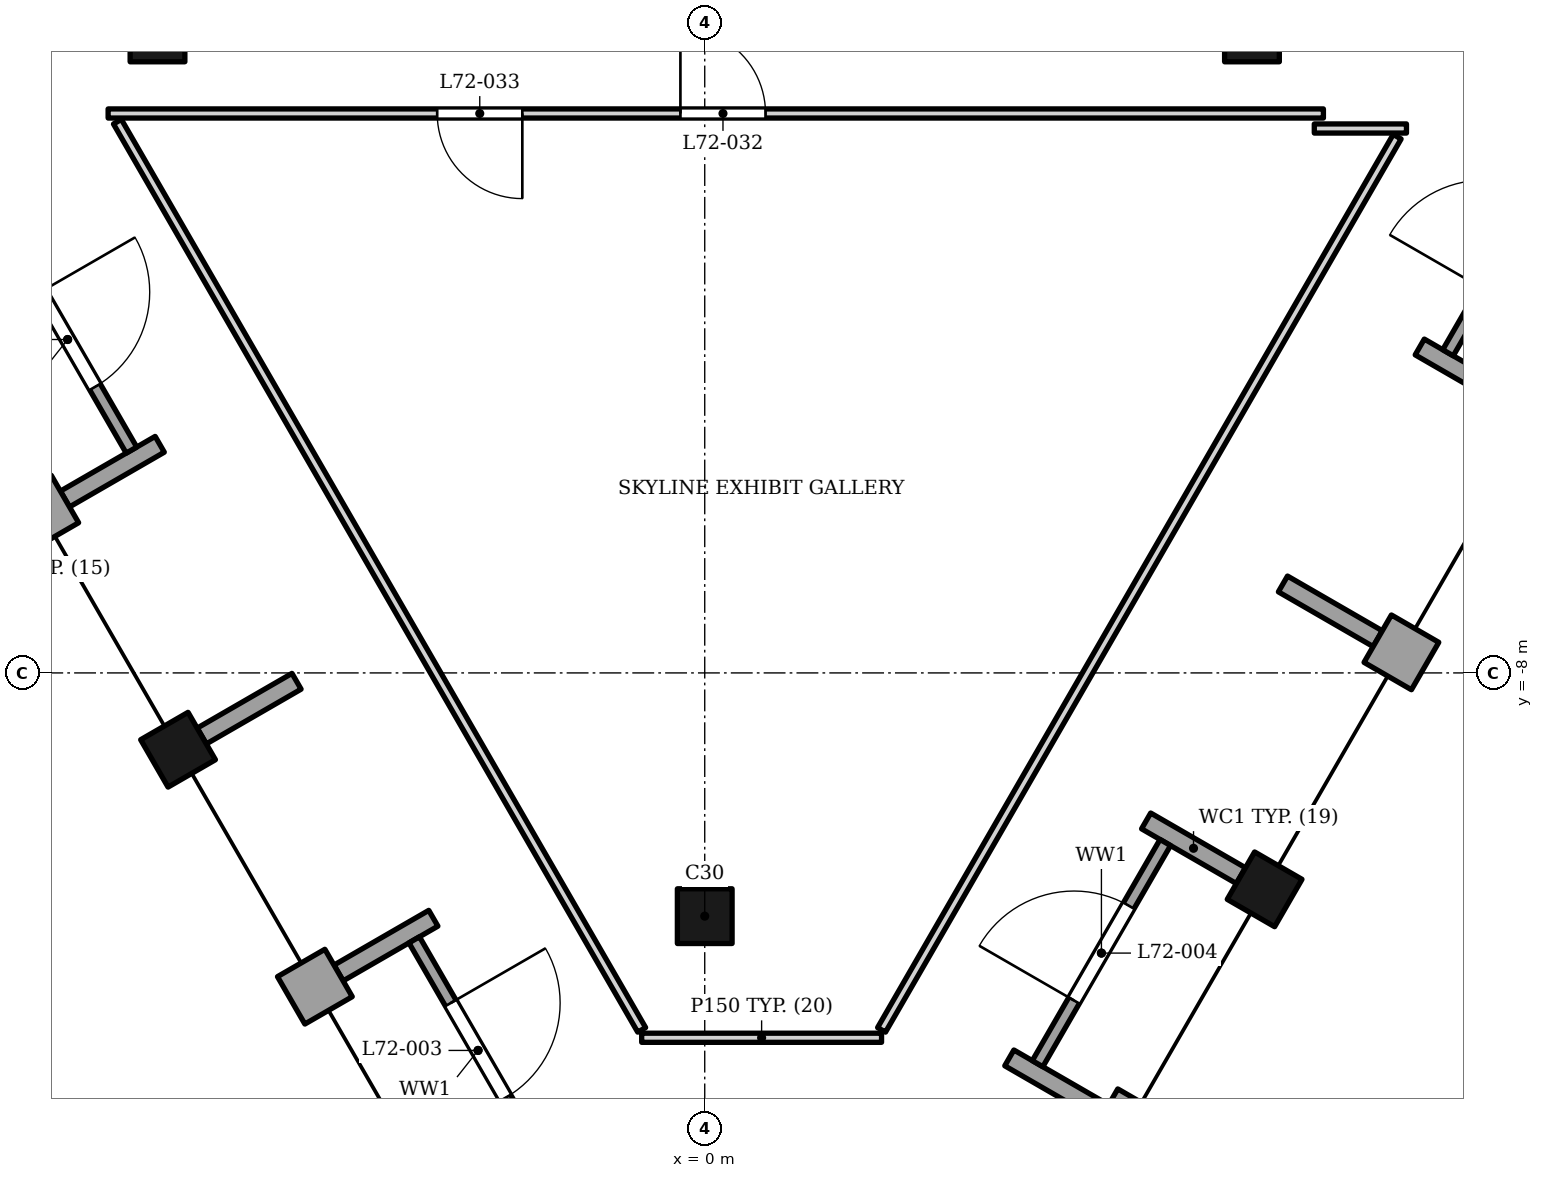
"""IFC4 building model, lengths in metres.
Left out: names, types, materials, properties, quantities, classifications, styles, units other than length and angle.
Written with IfcOpenShell. Run it as: python <this file> out.ifc"""

import sys

from ifc_helpers import new_model, si_unit, direction, frame, frame_2d, origin, origin_2d, place, context, subcontext, project, spatial, rectangle, extrude, element, fill, save


model = new_model("IFC4")
c1 = context("Model", 3, precision=1e-05, world=origin(), true_north=direction((0.0, 1.0)))
c2 = subcontext(c1, "Body", "Model", "MODEL_VIEW")
j1 = project(units=[si_unit("LENGTHUNIT", "METRE"), si_unit("PLANEANGLEUNIT", "RADIAN")], contexts=[c1])
p1 = place(None, origin())
s1 = spatial("IfcSite", under=j1, at=p1, CompositionType="ELEMENT")
p2 = place(p1, origin())
s2 = spatial("IfcBuilding", under=s1, at=p2, CompositionType="ELEMENT")
p3 = place(p2, frame((0.0, 0.0, 302.5)))
s3 = spatial("IfcBuildingStorey", under=s2, at=p3, CompositionType="ELEMENT", Elevation=302.5)
for number, where, z_axis, x_axis in (
    (1, (-9.0, 2.5, 0.0), (0.0, 0.0, 1.0), (1.0, 0.0, 0.0)),
    (2, (9.0, 2.5, 0.0), (0.0, 0.0, 1.0), (1.0, 0.0, 0.0)),
    (3, (0.0, -12.0, 0.0), (0.0, 0.0, 1.0), (1.0, 0.0, 0.0)),
    (4, (-8.662, -9.263, 0.0), (0.0, 0.0, 1.0), (0.5, -0.866, 0.0)),
    (5, (9.208, -11.559, 0.0), (0.0, 0.0, 1.0), (0.5, 0.866, 0.0)),
):
    element("IfcColumn", number, at=place(p3, frame(where, z_axis=z_axis, x_axis=x_axis)), inside=s3, PredefinedType="COLUMN", context=c2, shape_type="SweptSolid", body=[
        extrude(rectangle(XDim=0.9, YDim=0.9, at=origin_2d()), origin(), (0.0, 0.0, 1.0), 8.0),
    ])
p4 = place(p3, frame((-11.137, -4.976, 0.0), z_axis=(0.0, 0.0, 1.0), x_axis=(0.500223362819, -0.865896406789, 0.0)))
e6 = element("IfcWall", 6, at=p4, inside=s3, PredefinedType="SOLIDWALL", context=c2, shape_type="SweptSolid", body=[
    extrude(rectangle(XDim=0.9, YDim=0.9, at=frame_2d((0.45, 0.0))), origin(), (0.0, 0.0, 1.0), 7.0),
])
for number, where, z_axis, x_axis in (
    (7, (-10.522, -5.14, 0.0), (0.0, 0.0, 1.0), (0.866, 0.5, 0.0)),
    (8, (-6.713, -8.138, 0.0), (0.0, 0.0, 1.0), (-0.866, -0.5, 0.0)),
):
    element("IfcWall", number, at=place(p3, frame(where, z_axis=z_axis, x_axis=x_axis)), inside=s3, PredefinedType="SOLIDWALL", context=c2, shape_type="SweptSolid", body=[
        extrude(rectangle(XDim=1.8, YDim=0.3, at=frame_2d((0.9, 0.0))), origin(), (0.0, 0.0, 1.0), 7.0),
    ])
p5 = place(p3, frame((-6.187, -13.55, 0.0), z_axis=(0.0, 0.0, 1.0), x_axis=(-0.500105887137, 0.865964261186, 0.0)))
e9 = element("IfcWall", 9, at=p5, inside=s3, PredefinedType="SOLIDWALL", context=c2, shape_type="SweptSolid", body=[
    extrude(rectangle(XDim=0.9, YDim=0.9, at=frame_2d((0.45, 0.0))), origin(), (0.0, 0.0, 1.0), 7.0),
])
p6 = place(p3, frame((-6.022, -12.935, 0.0), z_axis=(0.0, 0.0, 1.0), x_axis=(0.865989075817, 0.500062916607, 0.0)))
e10 = element("IfcWall", 10, at=p6, inside=s3, PredefinedType="SOLIDWALL", context=c2, shape_type="SweptSolid", body=[
    extrude(rectangle(XDim=1.8, YDim=0.3, at=frame_2d((0.9, 0.0))), origin(), (0.0, 0.0, 1.0), 7.0),
])
p7 = place(p3, frame((-11.528, -0.698, 0.0), z_axis=(0.0, 0.0, 1.0), x_axis=(0.500002543286, -0.866023935413, 0.0)))
e11 = element("IfcWall", 11, at=p7, inside=s3, PredefinedType="ELEMENTEDWALL", context=c2, shape_type="SweptSolid", body=[
    extrude(rectangle(XDim=4.2, YDim=0.2, at=frame_2d((2.1, 0.0))), origin(), (0.0, 0.0, 1.0), 7.0),
])
p8 = place(p7, frame((1.2, 0.0, 0.0)))
e12 = element("IfcOpeningElement", 12, at=p8, cuts=e11, PredefinedType="OPENING", context=c2, shape_type="SweptSolid", body=[
    extrude(rectangle(XDim=1.8, YDim=2.7, at=frame_2d((0.9, 1.35))), frame((0.0, 0.11, 0.0), z_axis=(0.0, -1.0, 0.0), x_axis=(1.0, 0.0, 0.0)), (0.0, 0.0, 1.0), 0.22),
])
for number, where, z_axis, x_axis in (
    (13, (-10.687, -5.755, 0.0), (0.0, 0.0, 1.0), (0.5, -0.866, 0.0)),
    (14, (-8.437, -9.652, 0.0), (0.0, 0.0, 1.0), (0.5, -0.866, 0.0)),
    (15, (-6.187, -13.55, 0.0), (0.0, 0.0, 1.0), (0.5, -0.866, 0.0)),
):
    element("IfcWall", number, at=place(p3, frame(where, z_axis=z_axis, x_axis=x_axis)), inside=s3, PredefinedType="PARAPET", context=c2, shape_type="SweptSolid", body=[
        extrude(rectangle(XDim=3.6, YDim=0.2, at=frame_2d((1.8, 0.0))), origin(), (0.0, 0.0, 1.0), 1.1),
    ])
p9 = place(p3, frame((-4.778, -12.39, 0.0), z_axis=(0.0, 0.0, 1.0), x_axis=(0.500027713859, -0.866009402589, 0.0)))
e16 = element("IfcWall", 16, at=p9, inside=s3, PredefinedType="ELEMENTEDWALL", context=c2, shape_type="SweptSolid", body=[
    extrude(rectangle(XDim=4.2, YDim=0.2, at=frame_2d((2.1, 0.0))), origin(), (0.0, 0.0, 1.0), 7.0),
])
p10 = place(p9, frame((1.2, 0.0, 0.0)))
e17 = element("IfcOpeningElement", 17, at=p10, cuts=e16, PredefinedType="OPENING", context=c2, shape_type="SweptSolid", body=[
    extrude(rectangle(XDim=1.8, YDim=2.7, at=frame_2d((0.9, 1.35))), frame((0.0, 0.11, 0.0), z_axis=(0.0, -1.0, 0.0), x_axis=(1.0, 0.0, 0.0)), (0.0, 0.0, 1.0), 0.22),
])
p11 = place(p3, frame((7.348, -15.681, 0.0), z_axis=(0.0, 0.0, 1.0), x_axis=(-0.865964261186, 0.500105887137, 0.0)))
e18 = element("IfcWall", 18, at=p11, inside=s3, PredefinedType="SOLIDWALL", context=c2, shape_type="SweptSolid", body=[
    extrude(rectangle(XDim=0.9, YDim=0.9, at=frame_2d((0.45, 0.0))), origin(), (0.0, 0.0, 1.0), 7.0),
])
for number, where, z_axis, x_axis in (
    (19, (6.568, -15.231, 0.0), (0.0, 0.0, 1.0), (-0.866, 0.5, 0.0)),
    (20, (7.259, -10.434, 0.0), (0.0, 0.0, 1.0), (0.866, -0.5, 0.0)),
):
    element("IfcWall", number, at=place(p3, frame(where, z_axis=z_axis, x_axis=x_axis)), inside=s3, PredefinedType="SOLIDWALL", context=c2, shape_type="SweptSolid", body=[
        extrude(rectangle(XDim=1.8, YDim=0.3, at=frame_2d((0.9, 0.0))), origin(), (0.0, 0.0, 1.0), 7.0),
    ])
p12 = place(p3, frame((11.068, -7.437, 0.0), z_axis=(0.0, 0.0, 1.0), x_axis=(0.866081705922, -0.499902469156, 0.0)))
e21 = element("IfcWall", 21, at=p12, inside=s3, PredefinedType="SOLIDWALL", context=c2, shape_type="SweptSolid", body=[
    extrude(rectangle(XDim=0.9, YDim=0.9, at=frame_2d((0.45, 0.0))), origin(), (0.0, 0.0, 1.0), 7.0),
])
p13 = place(p3, frame((11.068, -7.437, 0.0), z_axis=(0.0, 0.0, 1.0), x_axis=(-0.866047807691, 0.499961193289, 0.0)))
e22 = element("IfcWall", 22, at=p13, inside=s3, PredefinedType="SOLIDWALL", context=c2, shape_type="SweptSolid", body=[
    extrude(rectangle(XDim=1.8, YDim=0.3, at=frame_2d((0.9, 0.0))), origin(), (0.0, 0.0, 1.0), 7.0),
])
p14 = place(p3, frame((11.759, -2.64, 0.0), z_axis=(0.0, 0.0, 1.0), x_axis=(0.866038726271, -0.499976924066, 0.0)))
e23 = element("IfcWall", 23, at=p14, inside=s3, PredefinedType="SOLIDWALL", context=c2, shape_type="SweptSolid", body=[
    extrude(rectangle(XDim=1.799, YDim=0.3, at=frame_2d((0.9, 0.0))), origin(), (0.0, 0.0, 1.0), 7.0),
])
p15 = place(p3, frame((7.183, -15.066, 0.0), z_axis=(0.0, 0.0, 1.0), x_axis=(0.500012057535, 0.866018442252, 0.0)))
e24 = element("IfcWall", 24, at=p15, inside=s3, PredefinedType="PARAPET", context=c2, shape_type="SweptSolid", body=[
    extrude(rectangle(XDim=3.6, YDim=0.2, at=frame_2d((1.8, 0.0))), origin(), (0.0, 0.0, 1.0), 1.1),
])
p16 = place(p3, frame((5.474, -14.426, 0.0), z_axis=(0.0, 0.0, 1.0), x_axis=(0.499958946799, 0.866049104564, 0.0)))
e25 = element("IfcWall", 25, at=p16, inside=s3, PredefinedType="ELEMENTEDWALL", context=c2, shape_type="SweptSolid", body=[
    extrude(rectangle(XDim=4.2, YDim=0.2, at=frame_2d((2.1, 0.0))), origin(), (0.0, 0.0, 1.0), 7.0),
])
p17 = place(p16, frame((1.2, 0.0, 0.0)))
e26 = element("IfcOpeningElement", 26, at=p17, cuts=e25, PredefinedType="OPENING", context=c2, shape_type="SweptSolid", body=[
    extrude(rectangle(XDim=1.8, YDim=2.7, at=frame_2d((0.9, 1.35))), frame((0.0, 0.11, 0.0), z_axis=(0.0, -1.0, 0.0), x_axis=(1.0, 0.0, 0.0)), (0.0, 0.0, 1.0), 0.22),
])
for number, where, z_axis, x_axis in (
    (27, (9.433, -11.169, 0.0), (0.0, 0.0, 1.0), (0.5, 0.866, 0.0)),
    (28, (11.683, -7.272, 0.0), (0.0, 0.0, 1.0), (0.5, 0.866, 0.0)),
):
    element("IfcWall", number, at=place(p3, frame(where, z_axis=z_axis, x_axis=x_axis)), inside=s3, PredefinedType="PARAPET", context=c2, shape_type="SweptSolid", body=[
        extrude(rectangle(XDim=3.6, YDim=0.2, at=frame_2d((1.8, 0.0))), origin(), (0.0, 0.0, 1.0), 1.1),
    ])
p18 = place(p3, frame((12.224, -2.735, 0.0), z_axis=(0.0, 0.0, 1.0), x_axis=(0.499958946799, 0.866049104564, 0.0)))
e29 = element("IfcWall", 29, at=p18, inside=s3, PredefinedType="ELEMENTEDWALL", context=c2, shape_type="SweptSolid", body=[
    extrude(rectangle(XDim=4.2, YDim=0.2, at=frame_2d((2.1, 0.0))), origin(), (0.0, 0.0, 1.0), 7.0),
])
p19 = place(p18, frame((1.2, 0.0, 0.0)))
e30 = element("IfcOpeningElement", 30, at=p19, cuts=e29, PredefinedType="OPENING", context=c2, shape_type="SweptSolid", body=[
    extrude(rectangle(XDim=1.8, YDim=2.7, at=frame_2d((0.9, 1.35))), frame((0.0, 0.11, 0.0), z_axis=(0.0, -1.0, 0.0), x_axis=(1.0, 0.0, 0.0)), (0.0, 0.0, 1.0), 0.22),
])
p20 = place(p3, frame((-1.037, -14.0, 0.0), z_axis=(0.0, 0.0, 1.0), x_axis=(1.0, 0.0, 0.0)))
e31 = element("IfcWall", 31, at=p20, inside=s3, PredefinedType="PARTITIONING", context=c2, shape_type="SweptSolid", body=[
    extrude(rectangle(XDim=3.945, YDim=0.15, at=frame_2d((1.973, 0.0))), origin(), (0.0, 0.0, 1.0), 7.1),
])
p21 = place(p3, frame((10.025, 0.953, 0.0), z_axis=(0.0, 0.0, 1.0), x_axis=(1.0, 0.0, 0.0)))
e32 = element("IfcWall", 32, at=p21, inside=s3, PredefinedType="PARTITIONING", context=c2, shape_type="SweptSolid", body=[
    extrude(rectangle(XDim=1.516, YDim=0.15, at=frame_2d((0.758, 0.0))), origin(), (0.0, 0.0, 1.0), 7.8),
])
p22 = place(p3, frame((-9.812, 1.2, 0.0), z_axis=(0.0, 0.0, 1.0), x_axis=(1.0, 0.0, 0.0)))
e33 = element("IfcWall", 33, at=p22, inside=s3, PredefinedType="PARTITIONING", context=c2, shape_type="SweptSolid", body=[
    extrude(rectangle(XDim=19.987, YDim=0.15, at=frame_2d((9.994, 0.0))), origin(), (0.0, 0.0, 1.0), 6.954),
])
p23 = place(p22, frame((9.412, 0.0, 0.0)))
e34 = element("IfcOpeningElement", 34, at=p23, cuts=e33, PredefinedType="OPENING", context=c2, shape_type="SweptSolid", body=[
    extrude(rectangle(XDim=1.4, YDim=2.1, at=frame_2d((0.7, 1.05))), frame((0.0, 0.085, 0.0), z_axis=(0.0, -1.0, 0.0), x_axis=(1.0, 0.0, 0.0)), (0.0, 0.0, 1.0), 0.17),
])
p24 = place(p22, frame((5.412, 0.0, 0.0)))
e35 = element("IfcOpeningElement", 35, at=p24, cuts=e33, PredefinedType="OPENING", context=c2, shape_type="SweptSolid", body=[
    extrude(rectangle(XDim=1.4, YDim=2.1, at=frame_2d((0.7, 1.05))), frame((0.0, 0.085, 0.0), z_axis=(0.0, -1.0, 0.0), x_axis=(1.0, 0.0, 0.0)), (0.0, 0.0, 1.0), 0.17),
])
p25 = place(p3, frame((-9.659, 1.065, 0.0), z_axis=(0.0, 0.0, 1.0), x_axis=(0.499970000572, -0.86604272327, 0.0)))
e36 = element("IfcWall", 36, at=p25, inside=s3, PredefinedType="PARTITIONING", context=c2, shape_type="SweptSolid", body=[
    extrude(rectangle(XDim=17.245, YDim=0.15, at=frame_2d((8.623, 0.0))), origin(), (0.0, 0.0, 1.0), 6.954),
])
p26 = place(p3, frame((2.908, -13.87, 0.0), z_axis=(0.0, 0.0, 1.0), x_axis=(0.499998658648, 0.866026178213, 0.0)))
e37 = element("IfcWall", 37, at=p26, inside=s3, PredefinedType="PARTITIONING", context=c2, shape_type="SweptSolid", body=[
    extrude(rectangle(XDim=16.96, YDim=0.15, at=frame_2d((8.48, 0.0))), origin(), (0.0, 0.0, 1.0), 6.954),
])
p27 = place(p8, origin())
e38 = element("IfcDoor", 38, at=p27, inside=s3, OperationType="SINGLE_SWING_LEFT", PredefinedType="DOOR", context=c2, shape_type="SweptSolid", body=[
    extrude(rectangle(XDim=1.8, YDim=2.7, at=frame_2d((0.9, 1.35))), frame((0.0, 0.025, 0.0), z_axis=(0.0, -1.0, 0.0), x_axis=(1.0, 0.0, 0.0)), (0.0, 0.0, 1.0), 0.05),
])
fill(e12, e38)
p28 = place(p10, origin())
e39 = element("IfcDoor", 39, at=p28, inside=s3, OperationType="SINGLE_SWING_LEFT", PredefinedType="DOOR", context=c2, shape_type="SweptSolid", body=[
    extrude(rectangle(XDim=1.8, YDim=2.7, at=frame_2d((0.9, 1.35))), frame((0.0, 0.025, 0.0), z_axis=(0.0, -1.0, 0.0), x_axis=(1.0, 0.0, 0.0)), (0.0, 0.0, 1.0), 0.05),
])
fill(e17, e39)
p29 = place(p17, origin())
e40 = element("IfcDoor", 40, at=p29, inside=s3, OperationType="SINGLE_SWING_LEFT", PredefinedType="DOOR", context=c2, shape_type="SweptSolid", body=[
    extrude(rectangle(XDim=1.8, YDim=2.7, at=frame_2d((0.9, 1.35))), frame((0.0, 0.025, 0.0), z_axis=(0.0, -1.0, 0.0), x_axis=(1.0, 0.0, 0.0)), (0.0, 0.0, 1.0), 0.05),
])
fill(e26, e40)
p30 = place(p23, origin())
e41 = element("IfcDoor", 41, at=p30, inside=s3, OperationType="SINGLE_SWING_LEFT", PredefinedType="DOOR", context=c2, shape_type="SweptSolid", body=[
    extrude(rectangle(XDim=1.4, YDim=2.1, at=frame_2d((0.7, 1.05))), frame((0.0, 0.025, 0.0), z_axis=(0.0, -1.0, 0.0), x_axis=(1.0, 0.0, 0.0)), (0.0, 0.0, 1.0), 0.05),
])
fill(e34, e41)
p31 = place(p24, origin())
e42 = element("IfcDoor", 42, at=p31, inside=s3, OperationType="SINGLE_SWING_RIGHT", PredefinedType="DOOR", context=c2, shape_type="SweptSolid", body=[
    extrude(rectangle(XDim=1.4, YDim=2.1, at=frame_2d((0.7, 1.05))), frame((0.0, 0.025, 0.0), z_axis=(0.0, -1.0, 0.0), x_axis=(1.0, 0.0, 0.0)), (0.0, 0.0, 1.0), 0.05),
])
fill(e35, e42)
save(model, sys.argv[1])
